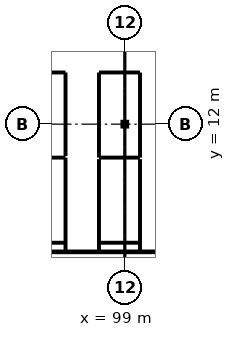
"""IFC4 building model, lengths in metres.
Left out: names, types, materials, properties, quantities, classifications, styles, units other than length and angle.
Written with IfcOpenShell. Run it as: python <this file> out.ifc"""

import sys

from ifc_helpers import new_model, si_unit, direction, frame, frame_2d, origin, origin_2d, place, context, subcontext, project, spatial, rectangle, i_section, extrude, element, fill, save


model = new_model("IFC4")
c1 = context("Model", 3, precision=1e-05, world=origin(), true_north=direction((0.0, 1.0)))
c2 = subcontext(c1, "Body", "Model", "MODEL_VIEW")
j1 = project(units=[si_unit("LENGTHUNIT", "METRE"), si_unit("PLANEANGLEUNIT", "RADIAN")], contexts=[c1])
p1 = place(None, origin())
s1 = spatial("IfcSite", under=j1, at=p1, CompositionType="ELEMENT")
p2 = place(p1, origin())
s2 = spatial("IfcBuilding", under=s1, at=p2, CompositionType="ELEMENT")
p3 = place(p2, frame((0.0, 0.0, 31.4)))
s3 = spatial("IfcBuildingStorey", under=s2, at=p3, CompositionType="ELEMENT", Elevation=31.4)
p4 = place(p3, frame((99.0, 12.0, 0.0), z_axis=(0.0, 0.0, 1.0), x_axis=(1.0, 0.0, 0.0)))
e1 = element("IfcColumn", 1, at=p4, inside=s3, PredefinedType="COLUMN", context=c2, shape_type="SweptSolid", body=[
    extrude(i_section(OverallWidth=0.26, OverallDepth=0.26, WebThickness=0.01, FlangeThickness=0.018, at=origin_2d()), origin(), (0.0, 0.0, 1.0), 4.0),
])
p5 = place(p3, frame((45.88, 3.6, 0.0), z_axis=(0.0, 0.0, 1.0), x_axis=(1.0, 0.0, 0.0)))
e2 = element("IfcWall", 2, at=p5, inside=s3, PredefinedType="PARTITIONING", context=c2, shape_type="SweptSolid", body=[
    extrude(rectangle(XDim=58.24, YDim=0.15, at=frame_2d((29.12, 0.0))), origin(), (0.0, 0.0, 1.0), 3.64),
])
p6 = place(p5, frame((27.795, 0.0, 0.0)))
e3 = element("IfcOpeningElement", 3, at=p6, cuts=e2, PredefinedType="OPENING", context=c2, shape_type="SweptSolid", body=[
    extrude(rectangle(XDim=1.05, YDim=2.25, at=frame_2d((0.525, 1.125))), frame((0.0, 0.09, 0.0), z_axis=(0.0, -1.0, 0.0), x_axis=(1.0, 0.0, 0.0)), (0.0, 0.0, 1.0), 0.18),
])
for number, where, z_axis, x_axis in (
    (4, (95.02, 4.2, 0.0), (0.0, 0.0, 1.0), (-1.0, 0.0, 0.0)),
    (5, (92.055, 9.8, 0.0), (0.0, 0.0, 1.0), (1.0, 0.0, 0.0)),
):
    element("IfcWall", number, at=place(p3, frame(where, z_axis=z_axis, x_axis=x_axis)), inside=s3, PredefinedType="PARTITIONING", context=c2, shape_type="SweptSolid", body=[
        extrude(rectangle(XDim=2.965, YDim=0.1, at=frame_2d((1.482, 0.0))), origin(), (0.0, 0.0, 1.0), 3.64),
    ])
p7 = place(p3, frame((95.1, 9.72, 0.0), z_axis=(0.0, 0.0, 1.0), x_axis=(0.0, -1.0, 0.0)))
e6 = element("IfcWall", 6, at=p7, inside=s3, PredefinedType="PARTITIONING", context=c2, shape_type="SweptSolid", body=[
    extrude(rectangle(XDim=6.05, YDim=0.1, at=frame_2d((3.025, 0.0))), origin(), (0.0, 0.0, 1.0), 3.64),
])
p8 = place(p7, frame((2.529, 0.0, 0.0)))
e7 = element("IfcOpeningElement", 7, at=p8, cuts=e6, PredefinedType="OPENING", context=c2, shape_type="SweptSolid", body=[
    extrude(rectangle(XDim=0.9, YDim=2.05, at=frame_2d((0.45, 1.025))), frame((0.0, 0.065, 0.0), z_axis=(0.0, -1.0, 0.0), x_axis=(1.0, 0.0, 0.0)), (0.0, 0.0, 1.0), 0.13),
])
p9 = place(p3, frame((92.48, 15.4, 0.0), z_axis=(0.0, 0.0, 1.0), x_axis=(1.0, 0.0, 0.0)))
e8 = element("IfcWall", 8, at=p9, inside=s3, PredefinedType="PARTITIONING", context=c2, shape_type="SweptSolid", body=[
    extrude(rectangle(XDim=2.54, YDim=0.1, at=frame_2d((1.27, 0.0))), origin(), (0.0, 0.0, 1.0), 3.64),
])
p10 = place(p3, frame((95.1, 15.32, 0.0), z_axis=(0.0, 0.0, 1.0), x_axis=(0.0, -1.0, 0.0)))
e9 = element("IfcWall", 9, at=p10, inside=s3, PredefinedType="PARTITIONING", context=c2, shape_type="SweptSolid", body=[
    extrude(rectangle(XDim=5.34, YDim=0.1, at=frame_2d((2.67, 0.0))), origin(), (0.0, 0.0, 1.0), 3.64),
])
p11 = place(p10, frame((2.22, 0.0, 0.0)))
e10 = element("IfcOpeningElement", 10, at=p11, cuts=e9, PredefinedType="OPENING", context=c2, shape_type="SweptSolid", body=[
    extrude(rectangle(XDim=0.9, YDim=2.05, at=frame_2d((0.45, 1.025))), frame((0.0, 0.065, 0.0), z_axis=(0.0, -1.0, 0.0), x_axis=(1.0, 0.0, 0.0)), (0.0, 0.0, 1.0), 0.13),
])
p12 = place(p3, frame((97.38, 15.4, 0.0), z_axis=(0.0, 0.0, 1.0), x_axis=(1.0, 0.0, 0.0)))
e11 = element("IfcWall", 11, at=p12, inside=s3, PredefinedType="PARTITIONING", context=c2, shape_type="SweptSolid", body=[
    extrude(rectangle(XDim=2.54, YDim=0.1, at=frame_2d((1.27, 0.0))), origin(), (0.0, 0.0, 1.0), 3.64),
])
p13 = place(p3, frame((100.0, 15.32, 0.0), z_axis=(0.0, 0.0, 1.0), x_axis=(0.0, -1.0, 0.0)))
e12 = element("IfcWall", 12, at=p13, inside=s3, PredefinedType="PARTITIONING", context=c2, shape_type="SweptSolid", body=[
    extrude(rectangle(XDim=5.44, YDim=0.1, at=frame_2d((2.72, 0.0))), origin(), (0.0, 0.0, 1.0), 3.64),
])
p14 = place(p3, frame((99.92, 9.8, 0.0), z_axis=(0.0, 0.0, 1.0), x_axis=(-1.0, 0.0, 0.0)))
e13 = element("IfcWall", 13, at=p14, inside=s3, PredefinedType="PARTITIONING", context=c2, shape_type="SweptSolid", body=[
    extrude(rectangle(XDim=2.54, YDim=0.1, at=frame_2d((1.27, 0.0))), origin(), (0.0, 0.0, 1.0), 3.64),
])
p15 = place(p3, frame((97.3, 9.88, 0.0), z_axis=(0.0, 0.0, 1.0), x_axis=(0.0, 1.0, 0.0)))
e14 = element("IfcWall", 14, at=p15, inside=s3, PredefinedType="PARTITIONING", context=c2, shape_type="SweptSolid", body=[
    extrude(rectangle(XDim=5.44, YDim=0.1, at=frame_2d((2.72, 0.0))), origin(), (0.0, 0.0, 1.0), 3.64),
])
p16 = place(p15, frame((2.22, 0.0, 0.0)))
e15 = element("IfcOpeningElement", 15, at=p16, cuts=e14, PredefinedType="OPENING", context=c2, shape_type="SweptSolid", body=[
    extrude(rectangle(XDim=1.0, YDim=2.1, at=frame_2d((0.5, 1.05))), frame((0.0, 0.065, 0.0), z_axis=(0.0, -1.0, 0.0), x_axis=(1.0, 0.0, 0.0)), (0.0, 0.0, 1.0), 0.13),
])
p17 = place(p3, frame((100.0, 9.62, 0.0), z_axis=(0.0, 0.0, 1.0), x_axis=(0.0, -1.0, 0.0)))
e16 = element("IfcWall", 16, at=p17, inside=s3, PredefinedType="PARTITIONING", context=c2, shape_type="SweptSolid", body=[
    extrude(rectangle(XDim=5.95, YDim=0.1, at=frame_2d((2.975, 0.0))), origin(), (0.0, 0.0, 1.0), 3.64),
])
p18 = place(p3, frame((99.955, 4.2, 0.0), z_axis=(0.0, 0.0, 1.0), x_axis=(-1.0, 0.0, 0.0)))
e17 = element("IfcWall", 17, at=p18, inside=s3, PredefinedType="PARTITIONING", context=c2, shape_type="SweptSolid", body=[
    extrude(rectangle(XDim=2.575, YDim=0.1, at=frame_2d((1.288, 0.0))), origin(), (0.0, 0.0, 1.0), 3.64),
])
p19 = place(p3, frame((97.3, 3.67, 0.0), z_axis=(0.0, 0.0, 1.0), x_axis=(0.0, 1.0, 0.0)))
e18 = element("IfcWall", 18, at=p19, inside=s3, PredefinedType="PARTITIONING", context=c2, shape_type="SweptSolid", body=[
    extrude(rectangle(XDim=5.95, YDim=0.1, at=frame_2d((2.975, 0.0))), origin(), (0.0, 0.0, 1.0), 3.64),
])
p20 = place(p19, frame((2.571, 0.0, 0.0)))
e19 = element("IfcOpeningElement", 19, at=p20, cuts=e18, PredefinedType="OPENING", context=c2, shape_type="SweptSolid", body=[
    extrude(rectangle(XDim=0.9, YDim=2.05, at=frame_2d((0.45, 1.025))), frame((0.0, 0.065, 0.0), z_axis=(0.0, -1.0, 0.0), x_axis=(1.0, 0.0, 0.0)), (0.0, 0.0, 1.0), 0.13),
])
p21 = place(p8, origin())
e20 = element("IfcDoor", 20, at=p21, inside=s3, OperationType="SINGLE_SWING_LEFT", PredefinedType="DOOR", context=c2, shape_type="SweptSolid", body=[
    extrude(rectangle(XDim=0.9, YDim=2.05, at=frame_2d((0.45, 1.025))), frame((0.0, 0.025, 0.0), z_axis=(0.0, -1.0, 0.0), x_axis=(1.0, 0.0, 0.0)), (0.0, 0.0, 1.0), 0.05),
])
fill(e7, e20)
p22 = place(p11, frame((0.9, 0.0, 0.0), z_axis=(0.0, 0.0, 1.0), x_axis=(-1.0, 0.0, 0.0)))
e21 = element("IfcDoor", 21, at=p22, inside=s3, OperationType="SINGLE_SWING_RIGHT", PredefinedType="DOOR", context=c2, shape_type="SweptSolid", body=[
    extrude(rectangle(XDim=0.9, YDim=2.05, at=frame_2d((0.45, 1.025))), frame((0.0, 0.025, 0.0), z_axis=(0.0, -1.0, 0.0), x_axis=(1.0, 0.0, 0.0)), (0.0, 0.0, 1.0), 0.05),
])
fill(e10, e21)
p23 = place(p16, origin())
e22 = element("IfcDoor", 22, at=p23, inside=s3, OperationType="SINGLE_SWING_LEFT", PredefinedType="DOOR", context=c2, shape_type="SweptSolid", body=[
    extrude(rectangle(XDim=1.0, YDim=2.1, at=frame_2d((0.5, 1.05))), frame((0.0, 0.025, 0.0), z_axis=(0.0, -1.0, 0.0), x_axis=(1.0, 0.0, 0.0)), (0.0, 0.0, 1.0), 0.05),
])
fill(e15, e22)
p24 = place(p20, frame((0.9, 0.0, 0.0), z_axis=(0.0, 0.0, 1.0), x_axis=(-1.0, 0.0, 0.0)))
e23 = element("IfcDoor", 23, at=p24, inside=s3, OperationType="SINGLE_SWING_RIGHT", PredefinedType="DOOR", context=c2, shape_type="SweptSolid", body=[
    extrude(rectangle(XDim=0.9, YDim=2.05, at=frame_2d((0.45, 1.025))), frame((0.0, 0.025, 0.0), z_axis=(0.0, -1.0, 0.0), x_axis=(1.0, 0.0, 0.0)), (0.0, 0.0, 1.0), 0.05),
])
fill(e19, e23)
save(model, sys.argv[1])
